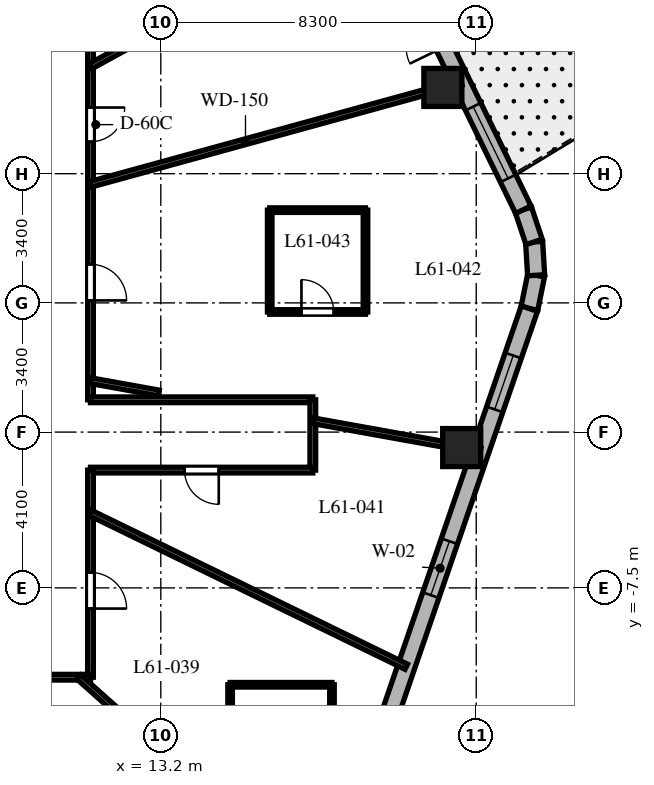
"""IFC4 building model, lengths in metres.
Left out: names, types, materials, properties, quantities, classifications, styles, units other than length and angle.
Written with IfcOpenShell. Run it as: python <this file> out.ifc"""

import sys

from ifc_helpers import new_model, si_unit, direction, frame, frame_2d, origin, origin_2d, place, context, subcontext, project, spatial, rectangle, extrude, element, fill, save


model = new_model("IFC4")
c1 = context("Model", 3, precision=1e-05, world=origin(), true_north=direction((0.0, 1.0)))
c2 = subcontext(c1, "Body", "Model", "MODEL_VIEW")
j1 = project(units=[si_unit("LENGTHUNIT", "METRE"), si_unit("PLANEANGLEUNIT", "RADIAN")], contexts=[c1])
p1 = place(None, origin())
s1 = spatial("IfcSite", under=j1, at=p1, CompositionType="ELEMENT")
p2 = place(p1, origin())
s2 = spatial("IfcBuilding", under=s1, at=p2, CompositionType="ELEMENT")
p3 = place(p2, frame((0.0, 0.0, 244.5)))
s3 = spatial("IfcBuildingStorey", under=s2, at=p3, CompositionType="ELEMENT", Elevation=244.5)
for number, where, z_axis, x_axis in (
    (1, (21.118, -3.807, 0.0), (0.0, 0.0, 1.0), (1.0, 0.0, 0.0)),
    (2, (20.622, 5.67, 0.0), (0.0, 0.0, 1.0), (1.0, 0.0, 0.0)),
):
    element("IfcColumn", number, at=place(p3, frame(where, z_axis=z_axis, x_axis=x_axis)), inside=s3, PredefinedType="COLUMN", context=c2, shape_type="SweptSolid", body=[
        extrude(rectangle(XDim=1.0, YDim=1.0, at=origin_2d()), origin(), (0.0, 0.0, 1.0), 3.8),
    ])
p4 = place(p3, frame((22.898, -0.15, 0.0), z_axis=(0.0, 0.0, 1.0), x_axis=(0.199055826889, 0.979988151858, 0.0)))
e3 = element("IfcWall", 3, at=p4, inside=s3, PredefinedType="SOLIDWALL", context=c2, shape_type="SweptSolid", body=[
    extrude(rectangle(XDim=0.894, YDim=0.45, at=frame_2d((0.447, 0.0))), origin(), (0.0, 0.0, 1.0), 3.5),
])
p5 = place(p3, frame((23.076, 0.727, 0.0), z_axis=(0.0, 0.0, 1.0), x_axis=(-0.060805222108, 0.998149650586, 0.0)))
e4 = element("IfcWall", 4, at=p5, inside=s3, PredefinedType="SOLIDWALL", context=c2, shape_type="SweptSolid", body=[
    extrude(rectangle(XDim=0.879, YDim=0.45, at=frame_2d((0.44, 0.0))), origin(), (0.0, 0.0, 1.0), 3.5),
])
p6 = place(p3, frame((23.023, 1.604, 0.0), z_axis=(0.0, 0.0, 1.0), x_axis=(-0.316801227695, 0.948491951537, 0.0)))
e5 = element("IfcWall", 5, at=p6, inside=s3, PredefinedType="SOLIDWALL", context=c2, shape_type="SweptSolid", body=[
    extrude(rectangle(XDim=0.894, YDim=0.45, at=frame_2d((0.447, 0.0))), origin(), (0.0, 0.0, 1.0), 3.5),
])
p7 = place(p3, frame((16.324, -19.275, 0.0), z_axis=(0.0, 0.0, 1.0), x_axis=(0.325083142304, 0.945685439557, 0.0)))
e6 = element("IfcWall", 6, at=p7, inside=s3, PredefinedType="SOLIDWALL", context=c2, shape_type="SweptSolid", body=[
    extrude(rectangle(XDim=20.224, YDim=0.45, at=frame_2d((10.112, 0.0))), origin(), (0.0, 0.0, 1.0), 3.5),
])
p8 = place(p7, frame((1.253, 0.0, 0.8)))
e7 = element("IfcOpeningElement", 7, at=p8, cuts=e6, PredefinedType="OPENING", context=c2, shape_type="SweptSolid", body=[
    extrude(rectangle(XDim=1.5, YDim=1.8, at=frame_2d((0.75, 0.9))), frame((0.0, 0.235, 0.0), z_axis=(0.0, -1.0, 0.0), x_axis=(1.0, 0.0, 0.0)), (0.0, 0.0, 1.0), 0.47),
])
p9 = place(p7, frame((6.568, 0.0, 0.8)))
e8 = element("IfcOpeningElement", 8, at=p9, cuts=e6, PredefinedType="OPENING", context=c2, shape_type="SweptSolid", body=[
    extrude(rectangle(XDim=1.5, YDim=1.8, at=frame_2d((0.75, 0.9))), frame((0.0, 0.235, 0.0), z_axis=(0.0, -1.0, 0.0), x_axis=(1.0, 0.0, 0.0)), (0.0, 0.0, 1.0), 0.47),
])
p10 = place(p7, frame((12.25, 0.0, 0.8)))
e9 = element("IfcOpeningElement", 9, at=p10, cuts=e6, PredefinedType="OPENING", context=c2, shape_type="SweptSolid", body=[
    extrude(rectangle(XDim=1.5, YDim=1.8, at=frame_2d((0.75, 0.9))), frame((0.0, 0.235, 0.0), z_axis=(0.0, -1.0, 0.0), x_axis=(1.0, 0.0, 0.0)), (0.0, 0.0, 1.0), 0.47),
])
p11 = place(p7, frame((17.418, 0.0, 0.8)))
e10 = element("IfcOpeningElement", 10, at=p11, cuts=e6, PredefinedType="OPENING", context=c2, shape_type="SweptSolid", body=[
    extrude(rectangle(XDim=1.5, YDim=1.8, at=frame_2d((0.75, 0.9))), frame((0.0, 0.235, 0.0), z_axis=(0.0, -1.0, 0.0), x_axis=(1.0, 0.0, 0.0)), (0.0, 0.0, 1.0), 0.47),
])
p12 = place(p3, frame((22.74, 2.452, 0.0), z_axis=(0.0, 0.0, 1.0), x_axis=(-0.437753424814, 0.899095066755, 0.0)))
e11 = element("IfcWall", 11, at=p12, inside=s3, PredefinedType="SOLIDWALL", context=c2, shape_type="SweptSolid", body=[
    extrude(rectangle(XDim=19.137, YDim=0.45, at=frame_2d((9.569, 0.0))), origin(), (0.0, 0.0, 1.0), 3.5),
])
p13 = place(p12, frame((4.763, 0.0, 0.0)))
e12 = element("IfcOpeningElement", 12, at=p13, cuts=e11, PredefinedType="OPENING", context=c2, shape_type="SweptSolid", body=[
    extrude(rectangle(XDim=1.0, YDim=2.15, at=frame_2d((0.5, 1.075))), frame((0.0, 0.235, 0.0), z_axis=(0.0, -1.0, 0.0), x_axis=(1.0, 0.0, 0.0)), (0.0, 0.0, 1.0), 0.47),
])
p14 = place(p12, frame((6.611, 0.0, 0.8)))
e13 = element("IfcOpeningElement", 13, at=p14, cuts=e11, PredefinedType="OPENING", context=c2, shape_type="SweptSolid", body=[
    extrude(rectangle(XDim=1.2, YDim=1.8, at=frame_2d((0.6, 0.9))), frame((0.0, 0.235, 0.0), z_axis=(0.0, -1.0, 0.0), x_axis=(1.0, 0.0, 0.0)), (0.0, 0.0, 1.0), 0.47),
])
p15 = place(p12, frame((10.856, 0.0, 0.8)))
e14 = element("IfcOpeningElement", 14, at=p15, cuts=e11, PredefinedType="OPENING", context=c2, shape_type="SweptSolid", body=[
    extrude(rectangle(XDim=2.1, YDim=1.85, at=frame_2d((1.05, 0.925))), frame((0.0, 0.235, 0.0), z_axis=(0.0, -1.0, 0.0), x_axis=(1.0, 0.0, 0.0)), (0.0, 0.0, 1.0), 0.47),
])
p16 = place(p12, frame((16.173, 0.0, 0.8)))
e15 = element("IfcOpeningElement", 15, at=p16, cuts=e11, PredefinedType="OPENING", context=c2, shape_type="SweptSolid", body=[
    extrude(rectangle(XDim=2.1, YDim=1.85, at=frame_2d((1.05, 0.925))), frame((0.0, 0.235, 0.0), z_axis=(0.0, -1.0, 0.0), x_axis=(1.0, 0.0, 0.0)), (0.0, 0.0, 1.0), 0.47),
])
p17 = place(p12, frame((0.916, 0.0, 0.8)))
e16 = element("IfcOpeningElement", 16, at=p17, cuts=e11, PredefinedType="OPENING", context=c2, shape_type="SweptSolid", body=[
    extrude(rectangle(XDim=2.1, YDim=1.85, at=frame_2d((1.05, 0.925))), frame((0.0, 0.235, 0.0), z_axis=(0.0, -1.0, 0.0), x_axis=(1.0, 0.0, 0.0)), (0.0, 0.0, 1.0), 0.47),
])
p18 = place(p3, frame((11.35, 9.85, 0.0), z_axis=(0.0, 0.0, 1.0), x_axis=(0.0, -1.0, 0.0)))
e17 = element("IfcWall", 17, at=p18, inside=s3, PredefinedType="PARTITIONING", context=c2, shape_type="SweptSolid", body=[
    extrude(rectangle(XDim=12.4, YDim=0.15, at=frame_2d((6.2, 0.0))), origin(), (0.0, 0.0, 1.0), 2.99),
])
p19 = place(p18, frame((4.709, 0.0, 0.0)))
e18 = element("IfcOpeningElement", 18, at=p19, cuts=e17, PredefinedType="OPENING", context=c2, shape_type="SweptSolid", body=[
    extrude(rectangle(XDim=0.9, YDim=2.03, at=frame_2d((0.45, 1.015))), frame((0.0, 0.085, 0.0), z_axis=(0.0, -1.0, 0.0), x_axis=(1.0, 0.0, 0.0)), (0.0, 0.0, 1.0), 0.17),
])
p20 = place(p18, frame((1.457, 0.0, 0.0)))
e19 = element("IfcOpeningElement", 19, at=p20, cuts=e17, PredefinedType="OPENING", context=c2, shape_type="SweptSolid", body=[
    extrude(rectangle(XDim=0.95, YDim=2.03, at=frame_2d((0.475, 1.015))), frame((0.0, 0.085, 0.0), z_axis=(0.0, -1.0, 0.0), x_axis=(1.0, 0.0, 0.0)), (0.0, 0.0, 1.0), 0.17),
])
p21 = place(p18, frame((8.835, 0.0, 0.0)))
e20 = element("IfcOpeningElement", 20, at=p21, cuts=e17, PredefinedType="OPENING", context=c2, shape_type="SweptSolid", body=[
    extrude(rectangle(XDim=0.95, YDim=2.03, at=frame_2d((0.475, 1.015))), frame((0.0, 0.085, 0.0), z_axis=(0.0, -1.0, 0.0), x_axis=(1.0, 0.0, 0.0)), (0.0, 0.0, 1.0), 0.17),
])
p22 = place(p3, frame((11.35, -2.55, 0.0), z_axis=(0.0, 0.0, 1.0), x_axis=(1.0, 0.0, 0.0)))
e21 = element("IfcWall", 21, at=p22, inside=s3, PredefinedType="PARTITIONING", context=c2, shape_type="SweptSolid", body=[
    extrude(rectangle(XDim=5.85, YDim=0.15, at=frame_2d((2.925, 0.0))), origin(), (0.0, 0.0, 1.0), 2.94),
])
p23 = place(p3, frame((17.2, -2.55, 0.0), z_axis=(0.0, 0.0, 1.0), x_axis=(0.0, -1.0, 0.0)))
e22 = element("IfcWall", 22, at=p23, inside=s3, PredefinedType="PARTITIONING", context=c2, shape_type="SweptSolid", body=[
    extrude(rectangle(XDim=1.85, YDim=0.15, at=frame_2d((0.925, 0.0))), origin(), (0.0, 0.0, 1.0), 2.94),
])
p24 = place(p3, frame((17.2, -4.4, 0.0), z_axis=(0.0, 0.0, 1.0), x_axis=(-1.0, 0.0, 0.0)))
e23 = element("IfcWall", 23, at=p24, inside=s3, PredefinedType="PARTITIONING", context=c2, shape_type="SweptSolid", body=[
    extrude(rectangle(XDim=5.85, YDim=0.15, at=frame_2d((2.925, 0.0))), origin(), (0.0, 0.0, 1.0), 2.94),
])
p25 = place(p24, frame((2.475, 0.0, 0.0)))
e24 = element("IfcOpeningElement", 24, at=p25, cuts=e23, PredefinedType="OPENING", context=c2, shape_type="SweptSolid", body=[
    extrude(rectangle(XDim=0.9, YDim=2.03, at=frame_2d((0.45, 1.015))), frame((0.0, 0.085, 0.0), z_axis=(0.0, -1.0, 0.0), x_axis=(1.0, 0.0, 0.0)), (0.0, 0.0, 1.0), 0.17),
])
p26 = place(p3, frame((11.35, -4.4, 0.0), z_axis=(0.0, 0.0, 1.0), x_axis=(0.0, -1.0, 0.0)))
e25 = element("IfcWall", 25, at=p26, inside=s3, PredefinedType="PARTITIONING", context=c2, shape_type="SweptSolid", body=[
    extrude(rectangle(XDim=5.45, YDim=0.15, at=frame_2d((2.725, 0.0))), origin(), (0.0, 0.0, 1.0), 2.99),
])
p27 = place(p26, frame((2.694, 0.0, 0.0)))
e26 = element("IfcOpeningElement", 26, at=p27, cuts=e25, PredefinedType="OPENING", context=c2, shape_type="SweptSolid", body=[
    extrude(rectangle(XDim=0.95, YDim=2.03, at=frame_2d((0.475, 1.015))), frame((0.0, 0.085, 0.0), z_axis=(0.0, -1.0, 0.0), x_axis=(1.0, 0.0, 0.0)), (0.0, 0.0, 1.0), 0.17),
])
p28 = place(p3, frame((11.35, -9.85, 0.0), z_axis=(0.0, 0.0, 1.0), x_axis=(-1.0, 0.0, 0.0)))
e27 = element("IfcWall", 27, at=p28, inside=s3, PredefinedType="PARTITIONING", context=c2, shape_type="SweptSolid", body=[
    extrude(rectangle(XDim=10.43, YDim=0.15, at=frame_2d((5.215, 0.0))), origin(), (0.0, 0.0, 1.0), 2.99),
])
p29 = place(p28, frame((8.362, 0.0, 0.0)))
e28 = element("IfcOpeningElement", 28, at=p29, cuts=e27, PredefinedType="OPENING", context=c2, shape_type="SweptSolid", body=[
    extrude(rectangle(XDim=0.95, YDim=2.03, at=frame_2d((0.475, 1.015))), frame((0.0, 0.085, 0.0), z_axis=(0.0, -1.0, 0.0), x_axis=(1.0, 0.0, 0.0)), (0.0, 0.0, 1.0), 0.17),
])
p30 = place(p28, frame((3.396, 0.0, 0.0)))
e29 = element("IfcOpeningElement", 29, at=p30, cuts=e27, PredefinedType="OPENING", context=c2, shape_type="SweptSolid", body=[
    extrude(rectangle(XDim=0.95, YDim=2.03, at=frame_2d((0.475, 1.015))), frame((0.0, 0.085, 0.0), z_axis=(0.0, -1.0, 0.0), x_axis=(1.0, 0.0, 0.0)), (0.0, 0.0, 1.0), 0.17),
])
p31 = place(p3, frame((11.35, 3.121, 0.0), z_axis=(0.0, 0.0, 1.0), x_axis=(0.964212793822, 0.265129568758, 0.0)))
e30 = element("IfcWall", 30, at=p31, inside=s3, PredefinedType="PARTITIONING", context=c2, shape_type="SweptSolid", body=[
    extrude(rectangle(XDim=10.12, YDim=0.15, at=frame_2d((5.06, 0.0))), origin(), (0.0, 0.0, 1.0), 2.74),
])
p32 = place(p3, frame((11.35, 6.227, 0.0), z_axis=(0.0, 0.0, 1.0), x_axis=(0.876723190824, 0.480995266786, 0.0)))
e31 = element("IfcWall", 31, at=p32, inside=s3, PredefinedType="PARTITIONING", context=c2, shape_type="SweptSolid", body=[
    extrude(rectangle(XDim=8.598, YDim=0.15, at=frame_2d((4.299, 0.0))), origin(), (0.0, 0.0, 1.0), 2.74),
])
p33 = place(p3, frame((11.048, -9.85, 0.0), z_axis=(0.0, 0.0, 1.0), x_axis=(0.746444434655, -0.665447748492, 0.0)))
e32 = element("IfcWall", 32, at=p33, inside=s3, PredefinedType="PARTITIONING", context=c2, shape_type="SweptSolid", body=[
    extrude(rectangle(XDim=8.732, YDim=0.15, at=frame_2d((4.366, 0.0))), origin(), (0.0, 0.0, 1.0), 2.74),
])
p34 = place(p3, frame((11.35, -5.528, 0.0), z_axis=(0.0, 0.0, 1.0), x_axis=(0.899038669565, -0.437869239188, 0.0)))
e33 = element("IfcWall", 33, at=p34, inside=s3, PredefinedType="PARTITIONING", context=c2, shape_type="SweptSolid", body=[
    extrude(rectangle(XDim=9.242, YDim=0.15, at=frame_2d((4.621, 0.0))), origin(), (0.0, 0.0, 1.0), 2.74),
])
p35 = place(p3, frame((11.35, -2.046, 0.0), z_axis=(0.0, 0.0, 1.0), x_axis=(0.984127783205, -0.177461281195, 0.0)))
e34 = element("IfcWall", 34, at=p35, inside=s3, PredefinedType="PARTITIONING", context=c2, shape_type="SweptSolid", body=[
    extrude(rectangle(XDim=1.826, YDim=0.15, at=frame_2d((0.913, 0.0))), origin(), (0.0, 0.0, 1.0), 3.5),
])
p36 = place(p3, frame((17.2, -3.101, 0.0), z_axis=(0.0, 0.0, 1.0), x_axis=(0.98413465883, -0.177423147559, 0.0)))
e35 = element("IfcWall", 35, at=p36, inside=s3, PredefinedType="PARTITIONING", context=c2, shape_type="SweptSolid", body=[
    extrude(rectangle(XDim=4.482, YDim=0.15, at=frame_2d((2.241, 0.0))), origin(), (0.0, 0.0, 1.0), 2.74),
])
p37 = place(p3, frame((17.704, -12.589, 0.0), z_axis=(0.0, 0.0, 1.0), x_axis=(0.0, 1.0, 0.0)))
e36 = element("IfcWall", 36, at=p37, inside=s3, PredefinedType="PARTITIONING", context=c2, shape_type="SweptSolid", body=[
    extrude(rectangle(XDim=2.54, YDim=0.12, at=frame_2d((1.27, 0.0))), origin(), (0.0, 0.0, 1.0), 3.5),
])
p38 = place(p3, frame((17.704, -10.049, 0.0), z_axis=(0.0, 0.0, 1.0), x_axis=(-1.0, 0.0, 0.0)))
e37 = element("IfcWall", 37, at=p38, inside=s3, PredefinedType="PARTITIONING", context=c2, shape_type="SweptSolid", body=[
    extrude(rectangle(XDim=2.68, YDim=0.12, at=frame_2d((1.34, 0.0))), origin(), (0.0, 0.0, 1.0), 3.073),
])
p39 = place(p3, frame((15.024, -10.049, 0.0), z_axis=(0.0, 0.0, 1.0), x_axis=(0.0, -1.0, 0.0)))
e38 = element("IfcWall", 38, at=p39, inside=s3, PredefinedType="PARTITIONING", context=c2, shape_type="SweptSolid", body=[
    extrude(rectangle(XDim=2.54, YDim=0.12, at=frame_2d((1.27, 0.0))), origin(), (0.0, 0.0, 1.0), 3.073),
])
p40 = place(p3, frame((16.066, -0.239, 0.0), z_axis=(0.0, 0.0, 1.0), x_axis=(1.0, 0.0, 0.0)))
e39 = element("IfcWall", 39, at=p40, inside=s3, PredefinedType="PARTITIONING", context=c2, shape_type="SweptSolid", body=[
    extrude(rectangle(XDim=2.52, YDim=0.12, at=frame_2d((1.26, 0.0))), origin(), (0.0, 0.0, 1.0), 2.94),
])
p41 = place(p40, frame((0.835, 0.0, 0.0)))
e40 = element("IfcOpeningElement", 40, at=p41, cuts=e39, PredefinedType="OPENING", context=c2, shape_type="SweptSolid", body=[
    extrude(rectangle(XDim=0.85, YDim=2.03, at=frame_2d((0.425, 1.015))), frame((0.0, 0.07, 0.0), z_axis=(0.0, -1.0, 0.0), x_axis=(1.0, 0.0, 0.0)), (0.0, 0.0, 1.0), 0.14),
])
p42 = place(p3, frame((18.586, -0.239, 0.0), z_axis=(0.0, 0.0, 1.0), x_axis=(0.0, 1.0, 0.0)))
e41 = element("IfcWall", 41, at=p42, inside=s3, PredefinedType="PARTITIONING", context=c2, shape_type="SweptSolid", body=[
    extrude(rectangle(XDim=2.68, YDim=0.12, at=frame_2d((1.34, 0.0))), origin(), (0.0, 0.0, 1.0), 3.5),
])
p43 = place(p3, frame((18.586, 2.441, 0.0), z_axis=(0.0, 0.0, 1.0), x_axis=(-1.0, 0.0, 0.0)))
e42 = element("IfcWall", 42, at=p43, inside=s3, PredefinedType="PARTITIONING", context=c2, shape_type="SweptSolid", body=[
    extrude(rectangle(XDim=2.52, YDim=0.12, at=frame_2d((1.26, 0.0))), origin(), (0.0, 0.0, 1.0), 2.94),
])
p44 = place(p3, frame((16.066, 2.441, 0.0), z_axis=(0.0, 0.0, 1.0), x_axis=(0.0, -1.0, 0.0)))
e43 = element("IfcWall", 43, at=p44, inside=s3, PredefinedType="PARTITIONING", context=c2, shape_type="SweptSolid", body=[
    extrude(rectangle(XDim=2.68, YDim=0.12, at=frame_2d((1.34, 0.0))), origin(), (0.0, 0.0, 1.0), 3.5),
])
p45 = place(p10, origin())
e44 = element("IfcWindow", 44, at=p45, inside=s3, PartitioningType="SINGLE_PANEL", PredefinedType="WINDOW", context=c2, shape_type="SweptSolid", body=[
    extrude(rectangle(XDim=1.5, YDim=1.8, at=frame_2d((0.75, 0.9))), frame((0.0, 0.03, 0.0), z_axis=(0.0, -1.0, 0.0), x_axis=(1.0, 0.0, 0.0)), (0.0, 0.0, 1.0), 0.06),
])
fill(e9, e44)
p46 = place(p11, origin())
e45 = element("IfcWindow", 45, at=p46, inside=s3, PartitioningType="SINGLE_PANEL", PredefinedType="WINDOW", context=c2, shape_type="SweptSolid", body=[
    extrude(rectangle(XDim=1.5, YDim=1.8, at=frame_2d((0.75, 0.9))), frame((0.0, 0.03, 0.0), z_axis=(0.0, -1.0, 0.0), x_axis=(1.0, 0.0, 0.0)), (0.0, 0.0, 1.0), 0.06),
])
fill(e10, e45)
p47 = place(p17, origin())
e46 = element("IfcWindow", 46, at=p47, inside=s3, PartitioningType="SINGLE_PANEL", PredefinedType="WINDOW", context=c2, shape_type="SweptSolid", body=[
    extrude(rectangle(XDim=2.1, YDim=1.85, at=frame_2d((1.05, 0.925))), frame((0.0, 0.03, 0.0), z_axis=(0.0, -1.0, 0.0), x_axis=(1.0, 0.0, 0.0)), (0.0, 0.0, 1.0), 0.06),
])
fill(e16, e46)
p48 = place(p19, origin())
e47 = element("IfcDoor", 47, at=p48, inside=s3, OperationType="SINGLE_SWING_LEFT", PredefinedType="DOOR", context=c2, shape_type="SweptSolid", body=[
    extrude(rectangle(XDim=0.9, YDim=2.03, at=frame_2d((0.45, 1.015))), frame((0.0, 0.025, 0.0), z_axis=(0.0, -1.0, 0.0), x_axis=(1.0, 0.0, 0.0)), (0.0, 0.0, 1.0), 0.05),
])
fill(e18, e47)
p49 = place(p27, origin())
e48 = element("IfcDoor", 48, at=p49, inside=s3, OperationType="SINGLE_SWING_RIGHT", PredefinedType="DOOR", context=c2, shape_type="SweptSolid", body=[
    extrude(rectangle(XDim=0.95, YDim=2.03, at=frame_2d((0.475, 1.015))), frame((0.0, 0.025, 0.0), z_axis=(0.0, -1.0, 0.0), x_axis=(1.0, 0.0, 0.0)), (0.0, 0.0, 1.0), 0.05),
])
fill(e26, e48)
p50 = place(p25, origin())
e49 = element("IfcDoor", 49, at=p50, inside=s3, OperationType="SINGLE_SWING_LEFT", PredefinedType="DOOR", context=c2, shape_type="SweptSolid", body=[
    extrude(rectangle(XDim=0.9, YDim=2.03, at=frame_2d((0.45, 1.015))), frame((0.0, 0.025, 0.0), z_axis=(0.0, -1.0, 0.0), x_axis=(1.0, 0.0, 0.0)), (0.0, 0.0, 1.0), 0.05),
])
fill(e24, e49)
p51 = place(p21, origin())
e50 = element("IfcDoor", 50, at=p51, inside=s3, OperationType="SINGLE_SWING_RIGHT", PredefinedType="DOOR", context=c2, shape_type="SweptSolid", body=[
    extrude(rectangle(XDim=0.95, YDim=2.03, at=frame_2d((0.475, 1.015))), frame((0.0, 0.025, 0.0), z_axis=(0.0, -1.0, 0.0), x_axis=(1.0, 0.0, 0.0)), (0.0, 0.0, 1.0), 0.05),
])
fill(e20, e50)
p52 = place(p41, origin())
e51 = element("IfcDoor", 51, at=p52, inside=s3, OperationType="SINGLE_SWING_LEFT", PredefinedType="DOOR", context=c2, shape_type="SweptSolid", body=[
    extrude(rectangle(XDim=0.85, YDim=2.03, at=frame_2d((0.425, 1.015))), frame((0.0, 0.025, 0.0), z_axis=(0.0, -1.0, 0.0), x_axis=(1.0, 0.0, 0.0)), (0.0, 0.0, 1.0), 0.05),
])
fill(e40, e51)
save(model, sys.argv[1])
